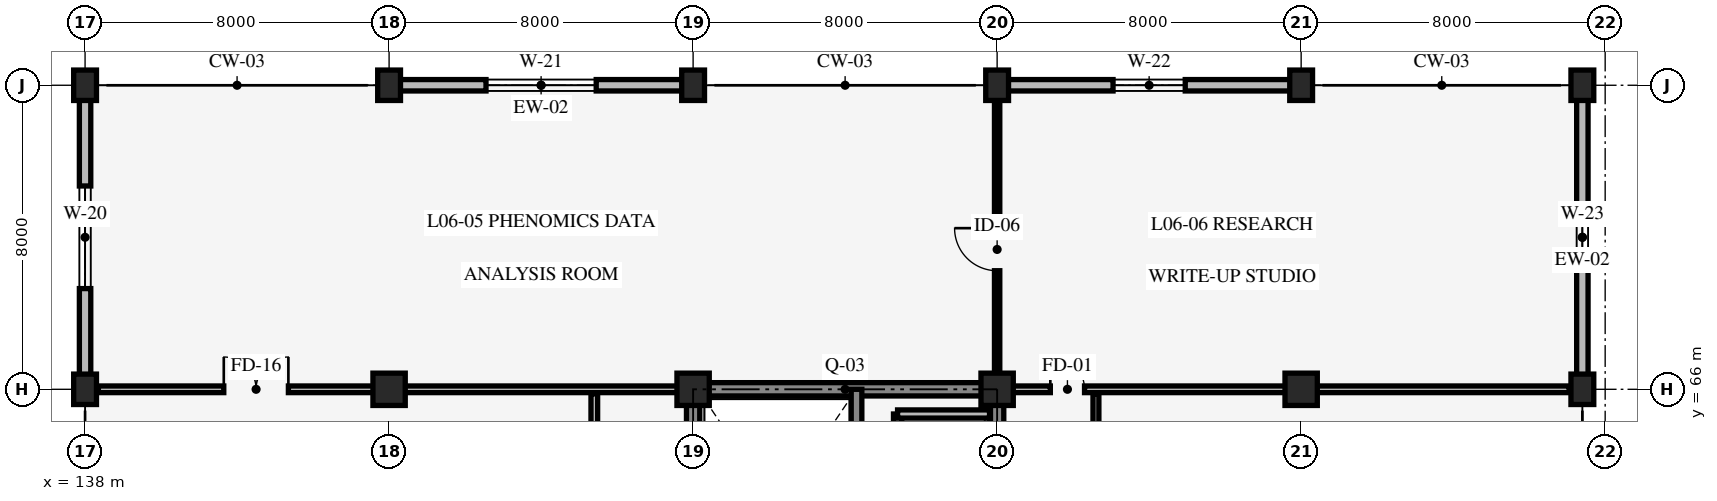
"""IFC4 building model, lengths in metres.
Left out: names, types, materials, properties, quantities, classifications, styles, units other than length and angle.
Written with IfcOpenShell. Run it as: python <this file> out.ifc"""

import sys

from ifc_helpers import new_model, si_unit, direction, frame, frame_2d, origin, origin_2d, place, context, subcontext, project, spatial, rectangle, extrude, element, fill, save


model = new_model("IFC4")
c1 = context("Model", 3, precision=1e-05, world=origin(), true_north=direction((0.0, 1.0)))
c2 = subcontext(c1, "Body", "Model", "MODEL_VIEW")
j1 = project(units=[si_unit("LENGTHUNIT", "METRE"), si_unit("PLANEANGLEUNIT", "RADIAN")], contexts=[c1])
p1 = place(None, origin())
s1 = spatial("IfcSite", under=j1, at=p1, CompositionType="ELEMENT")
p2 = place(p1, origin())
s2 = spatial("IfcBuilding", under=s1, at=p2, CompositionType="ELEMENT")
p3 = place(p2, frame((0.0, 0.0, 23.4)))
s3 = spatial("IfcBuildingStorey", under=s2, at=p3, CompositionType="ELEMENT", Elevation=23.4)
p4 = place(p3, frame((162.0, 58.0, 0.0), z_axis=(0.0, 0.0, 1.0), x_axis=(0.0, 1.0, 0.0)))
e1 = element("IfcWall", 1, at=p4, inside=s3, PredefinedType="SHEAR", context=c2, shape_type="SweptSolid", body=[
    extrude(rectangle(XDim=8.0, YDim=0.35, at=frame_2d((4.0, 0.0))), origin(), (0.0, 0.0, 1.0), 3.95),
])
p5 = place(p4, frame((3.275, 0.0, 0.0)))
e2 = element("IfcOpeningElement", 2, at=p5, cuts=e1, PredefinedType="OPENING", context=c2, shape_type="SweptSolid", body=[
    extrude(rectangle(XDim=1.05, YDim=2.2, at=frame_2d((0.525, 1.1))), frame((0.0, 0.185, 0.0), z_axis=(0.0, -1.0, 0.0), x_axis=(1.0, 0.0, 0.0)), (0.0, 0.0, 1.0), 0.37),
])
p6 = place(p4, frame((5.45, 0.0, 0.0)))
e3 = element("IfcOpeningElement", 3, at=p6, cuts=e1, PredefinedType="OPENING", context=c2, shape_type="SweptSolid", body=[
    extrude(rectangle(XDim=1.4, YDim=2.3, at=frame_2d((0.7, 1.15))), frame((0.0, 0.185, 0.0), z_axis=(0.0, -1.0, 0.0), x_axis=(1.0, 0.0, 0.0)), (0.0, 0.0, 1.0), 0.37),
])
for number, where, z_axis, x_axis in (
    (4, (162.0, 66.0, 0.0), (0.0, 0.0, 1.0), (-1.0, 0.0, 0.0)),
    (5, (154.0, 66.0, 0.0), (0.0, 0.0, 1.0), (0.0, -1.0, 0.0)),
):
    element("IfcWall", number, at=place(p3, frame(where, z_axis=z_axis, x_axis=x_axis)), inside=s3, PredefinedType="SHEAR", context=c2, shape_type="SweptSolid", body=[
        extrude(rectangle(XDim=8.0, YDim=0.35, at=frame_2d((4.0, 0.0))), origin(), (0.0, 0.0, 1.0), 3.95),
    ])
p7 = place(p3, frame((158.3, 58.0, 0.0), z_axis=(0.0, 0.0, 1.0), x_axis=(0.0, 1.0, 0.0)))
e6 = element("IfcWall", 6, at=p7, inside=s3, PredefinedType="SHEAR", context=c2, shape_type="SweptSolid", body=[
    extrude(rectangle(XDim=8.0, YDim=0.28, at=frame_2d((4.0, 0.0))), origin(), (0.0, 0.0, 1.0), 3.95),
])
for number, where, z_axis, x_axis in (
    (7, (138.0, 66.0, 0.0), (0.0, 0.0, 1.0), (1.0, 0.0, 0.0)),
    (8, (138.0, 74.0, 0.0), (0.0, 0.0, 1.0), (1.0, 0.0, 0.0)),
):
    element("IfcColumn", number, at=place(p3, frame(where, z_axis=z_axis, x_axis=x_axis)), inside=s3, PredefinedType="COLUMN", context=c2, shape_type="SweptSolid", body=[
        extrude(rectangle(XDim=0.6, YDim=0.8, at=origin_2d()), origin(), (0.0, 0.0, 1.0), 4.2),
    ])
p8 = place(p3, frame((146.0, 66.0, 0.0), z_axis=(0.0, 0.0, 1.0), x_axis=(1.0, 0.0, 0.0)))
e9 = element("IfcColumn", 9, at=p8, inside=s3, PredefinedType="COLUMN", context=c2, shape_type="SweptSolid", body=[
    extrude(rectangle(XDim=0.85, YDim=0.85, at=origin_2d()), origin(), (0.0, 0.0, 1.0), 4.2),
])
p9 = place(p3, frame((146.0, 74.0, 0.0), z_axis=(0.0, 0.0, 1.0), x_axis=(1.0, 0.0, 0.0)))
e10 = element("IfcColumn", 10, at=p9, inside=s3, PredefinedType="COLUMN", context=c2, shape_type="SweptSolid", body=[
    extrude(rectangle(XDim=0.6, YDim=0.8, at=origin_2d()), origin(), (0.0, 0.0, 1.0), 4.2),
])
p10 = place(p3, frame((154.0, 66.0, 0.0), z_axis=(0.0, 0.0, 1.0), x_axis=(1.0, 0.0, 0.0)))
e11 = element("IfcColumn", 11, at=p10, inside=s3, PredefinedType="COLUMN", context=c2, shape_type="SweptSolid", body=[
    extrude(rectangle(XDim=0.85, YDim=0.85, at=origin_2d()), origin(), (0.0, 0.0, 1.0), 4.2),
])
p11 = place(p3, frame((154.0, 74.0, 0.0), z_axis=(0.0, 0.0, 1.0), x_axis=(1.0, 0.0, 0.0)))
e12 = element("IfcColumn", 12, at=p11, inside=s3, PredefinedType="COLUMN", context=c2, shape_type="SweptSolid", body=[
    extrude(rectangle(XDim=0.6, YDim=0.8, at=origin_2d()), origin(), (0.0, 0.0, 1.0), 4.2),
])
p12 = place(p3, frame((162.0, 66.0, 0.0), z_axis=(0.0, 0.0, 1.0), x_axis=(1.0, 0.0, 0.0)))
e13 = element("IfcColumn", 13, at=p12, inside=s3, PredefinedType="COLUMN", context=c2, shape_type="SweptSolid", body=[
    extrude(rectangle(XDim=0.85, YDim=0.85, at=origin_2d()), origin(), (0.0, 0.0, 1.0), 4.2),
])
p13 = place(p3, frame((162.0, 74.0, 0.0), z_axis=(0.0, 0.0, 1.0), x_axis=(1.0, 0.0, 0.0)))
e14 = element("IfcColumn", 14, at=p13, inside=s3, PredefinedType="COLUMN", context=c2, shape_type="SweptSolid", body=[
    extrude(rectangle(XDim=0.6, YDim=0.8, at=origin_2d()), origin(), (0.0, 0.0, 1.0), 4.2),
])
p14 = place(p3, frame((170.0, 66.0, 0.0), z_axis=(0.0, 0.0, 1.0), x_axis=(1.0, 0.0, 0.0)))
e15 = element("IfcColumn", 15, at=p14, inside=s3, PredefinedType="COLUMN", context=c2, shape_type="SweptSolid", body=[
    extrude(rectangle(XDim=0.85, YDim=0.85, at=origin_2d()), origin(), (0.0, 0.0, 1.0), 4.2),
])
for number, where, z_axis, x_axis in (
    (16, (170.0, 74.0, 0.0), (0.0, 0.0, 1.0), (1.0, 0.0, 0.0)),
    (17, (177.4, 66.0, 0.0), (0.0, 0.0, 1.0), (1.0, 0.0, 0.0)),
    (18, (177.4, 74.0, 0.0), (0.0, 0.0, 1.0), (1.0, 0.0, 0.0)),
):
    element("IfcColumn", number, at=place(p3, frame(where, z_axis=z_axis, x_axis=x_axis)), inside=s3, PredefinedType="COLUMN", context=c2, shape_type="SweptSolid", body=[
        extrude(rectangle(XDim=0.6, YDim=0.8, at=origin_2d()), origin(), (0.0, 0.0, 1.0), 4.2),
    ])
p15 = place(p3, frame((138.0, 66.0, 0.0), z_axis=(0.0, 0.0, 1.0), x_axis=(0.0, 1.0, 0.0)))
e19 = element("IfcWall", 19, at=p15, inside=s3, PredefinedType="STANDARD", context=c2, shape_type="SweptSolid", body=[
    extrude(rectangle(XDim=8.0, YDim=0.3, at=frame_2d((4.0, 0.0))), origin(), (0.0, 0.0, 1.0), 3.19),
])
p16 = place(p15, frame((2.65, 0.0, 0.85)))
e20 = element("IfcOpeningElement", 20, at=p16, cuts=e19, PredefinedType="OPENING", context=c2, shape_type="SweptSolid", body=[
    extrude(rectangle(XDim=2.7, YDim=1.8, at=frame_2d((1.35, 0.9))), frame((0.0, 0.16, 0.0), z_axis=(0.0, -1.0, 0.0), x_axis=(1.0, 0.0, 0.0)), (0.0, 0.0, 1.0), 0.32),
])
p17 = place(p3, frame((146.0, 74.0, 0.0), z_axis=(0.0, 0.0, 1.0), x_axis=(1.0, 0.0, 0.0)))
e21 = element("IfcWall", 21, at=p17, inside=s3, PredefinedType="STANDARD", context=c2, shape_type="SweptSolid", body=[
    extrude(rectangle(XDim=8.0, YDim=0.3, at=frame_2d((4.0, 0.0))), origin(), (0.0, 0.0, 1.0), 3.14),
])
p18 = place(p17, frame((2.55, 0.0, 0.85)))
e22 = element("IfcOpeningElement", 22, at=p18, cuts=e21, PredefinedType="OPENING", context=c2, shape_type="SweptSolid", body=[
    extrude(rectangle(XDim=2.9, YDim=1.7, at=frame_2d((1.45, 0.85))), frame((0.0, 0.16, 0.0), z_axis=(0.0, -1.0, 0.0), x_axis=(1.0, 0.0, 0.0)), (0.0, 0.0, 1.0), 0.32),
])
p19 = place(p3, frame((162.0, 74.0, 0.0), z_axis=(0.0, 0.0, 1.0), x_axis=(1.0, 0.0, 0.0)))
e23 = element("IfcWall", 23, at=p19, inside=s3, PredefinedType="STANDARD", context=c2, shape_type="SweptSolid", body=[
    extrude(rectangle(XDim=8.0, YDim=0.3, at=frame_2d((4.0, 0.0))), origin(), (0.0, 0.0, 1.0), 3.14),
])
p20 = place(p19, frame((3.05, 0.0, 0.85)))
e24 = element("IfcOpeningElement", 24, at=p20, cuts=e23, PredefinedType="OPENING", context=c2, shape_type="SweptSolid", body=[
    extrude(rectangle(XDim=1.9, YDim=1.3, at=frame_2d((0.95, 0.65))), frame((0.0, 0.16, 0.0), z_axis=(0.0, -1.0, 0.0), x_axis=(1.0, 0.0, 0.0)), (0.0, 0.0, 1.0), 0.32),
])
p21 = place(p3, frame((177.4, 74.0, 0.0), z_axis=(0.0, 0.0, 1.0), x_axis=(0.0, -1.0, 0.0)))
e25 = element("IfcWall", 25, at=p21, inside=s3, PredefinedType="STANDARD", context=c2, shape_type="SweptSolid", body=[
    extrude(rectangle(XDim=8.0, YDim=0.3, at=frame_2d((4.0, 0.0))), origin(), (0.0, 0.0, 1.0), 3.19),
])
p22 = place(p21, frame((3.15, 0.0, 0.85)))
e26 = element("IfcOpeningElement", 26, at=p22, cuts=e25, PredefinedType="OPENING", context=c2, shape_type="SweptSolid", body=[
    extrude(rectangle(XDim=1.7, YDim=1.2, at=frame_2d((0.85, 0.6))), frame((0.0, 0.16, 0.0), z_axis=(0.0, -1.0, 0.0), x_axis=(1.0, 0.0, 0.0)), (0.0, 0.0, 1.0), 0.32),
])
p23 = place(p3, frame((159.38, 62.9, 0.0), z_axis=(0.0, 0.0, 1.0), x_axis=(0.0, 1.0, 0.0)))
e27 = element("IfcWall", 27, at=p23, inside=s3, PredefinedType="STANDARD", context=c2, shape_type="SweptSolid", body=[
    extrude(rectangle(XDim=2.45, YDim=0.215, at=frame_2d((1.225, 0.0))), origin(), (0.0, 0.0, 1.0), 3.9),
])
p24 = place(p3, frame((159.38, 65.35, 0.0), z_axis=(0.0, 0.0, 1.0), x_axis=(1.0, 0.0, 0.0)))
e28 = element("IfcWall", 28, at=p24, inside=s3, PredefinedType="STANDARD", context=c2, shape_type="SweptSolid", body=[
    extrude(rectangle(XDim=2.42, YDim=0.215, at=frame_2d((1.21, 0.0))), origin(), (0.0, 0.0, 1.0), 3.9),
])
p25 = place(p3, frame((151.4, 50.12, 0.0), z_axis=(0.0, 0.0, 1.0), x_axis=(0.0, 1.0, 0.0)))
e29 = element("IfcWall", 29, at=p25, inside=s3, PredefinedType="STANDARD", context=c2, shape_type="SweptSolid", body=[
    extrude(rectangle(XDim=15.76, YDim=0.175, at=frame_2d((7.88, 0.0))), origin(), (0.0, 0.0, 1.0), 3.9),
])
p26 = place(p25, frame((7.23, 0.0, 0.0)))
e30 = element("IfcOpeningElement", 30, at=p26, cuts=e29, PredefinedType="OPENING", context=c2, shape_type="SweptSolid", body=[
    extrude(rectangle(XDim=1.3, YDim=2.15, at=frame_2d((0.65, 1.075))), frame((0.0, 0.098, 0.0), z_axis=(0.0, -1.0, 0.0), x_axis=(1.0, 0.0, 0.0)), (0.0, 0.0, 1.0), 0.195),
])
p27 = place(p3, frame((164.6, 58.08, 0.0), z_axis=(0.0, 0.0, 1.0), x_axis=(0.0, 1.0, 0.0)))
e31 = element("IfcWall", 31, at=p27, inside=s3, PredefinedType="STANDARD", context=c2, shape_type="SweptSolid", body=[
    extrude(rectangle(XDim=7.8, YDim=0.155, at=frame_2d((3.9, 0.0))), origin(), (0.0, 0.0, 1.0), 3.9),
])
p28 = place(p27, frame((3.1, 0.0, 0.0)))
e32 = element("IfcOpeningElement", 32, at=p28, cuts=e31, PredefinedType="OPENING", context=c2, shape_type="SweptSolid", body=[
    extrude(rectangle(XDim=1.6, YDim=2.25, at=frame_2d((0.8, 1.125))), frame((0.0, 0.087, 0.0), z_axis=(0.0, -1.0, 0.0), x_axis=(1.0, 0.0, 0.0)), (0.0, 0.0, 1.0), 0.175),
])
p29 = place(p3, frame((138.35, 66.0, 0.0), z_axis=(0.0, 0.0, 1.0), x_axis=(1.0, 0.0, 0.0)))
e33 = element("IfcWall", 33, at=p29, inside=s3, PredefinedType="STANDARD", context=c2, shape_type="SweptSolid", body=[
    extrude(rectangle(XDim=15.3, YDim=0.175, at=frame_2d((7.65, 0.0))), origin(), (0.0, 0.0, 1.0), 3.14),
])
p30 = place(p29, frame((3.3, 0.0, 0.0)))
e34 = element("IfcOpeningElement", 34, at=p30, cuts=e33, PredefinedType="OPENING", context=c2, shape_type="SweptSolid", body=[
    extrude(rectangle(XDim=1.7, YDim=2.3, at=frame_2d((0.85, 1.15))), frame((0.0, 0.098, 0.0), z_axis=(0.0, -1.0, 0.0), x_axis=(1.0, 0.0, 0.0)), (0.0, 0.0, 1.0), 0.195),
])
p31 = place(p3, frame((162.0, 66.12, 0.0), z_axis=(0.0, 0.0, 1.0), x_axis=(0.0, 1.0, 0.0)))
e35 = element("IfcWall", 35, at=p31, inside=s3, PredefinedType="STANDARD", context=c2, shape_type="SweptSolid", body=[
    extrude(rectangle(XDim=7.83, YDim=0.14, at=frame_2d((3.915, 0.0))), origin(), (0.0, 0.0, 1.0), 3.19),
])
p32 = place(p31, frame((3.0, 0.0, 0.0)))
e36 = element("IfcOpeningElement", 36, at=p32, cuts=e35, PredefinedType="OPENING", context=c2, shape_type="SweptSolid", body=[
    extrude(rectangle(XDim=1.12, YDim=2.12, at=frame_2d((0.56, 1.06))), frame((0.0, 0.08, 0.0), z_axis=(0.0, -1.0, 0.0), x_axis=(1.0, 0.0, 0.0)), (0.0, 0.0, 1.0), 0.16),
])
p33 = place(p3, frame((162.35, 66.0, 0.0), z_axis=(0.0, 0.0, 1.0), x_axis=(1.0, 0.0, 0.0)))
e37 = element("IfcWall", 37, at=p33, inside=s3, PredefinedType="STANDARD", context=c2, shape_type="SweptSolid", body=[
    extrude(rectangle(XDim=14.7, YDim=0.175, at=frame_2d((7.35, 0.0))), origin(), (0.0, 0.0, 1.0), 3.14),
])
p34 = place(p33, frame((1.05, 0.0, 0.0)))
e38 = element("IfcOpeningElement", 38, at=p34, cuts=e37, PredefinedType="OPENING", context=c2, shape_type="SweptSolid", body=[
    extrude(rectangle(XDim=0.9, YDim=2.1, at=frame_2d((0.45, 1.05))), frame((0.0, 0.098, 0.0), z_axis=(0.0, -1.0, 0.0), x_axis=(1.0, 0.0, 0.0)), (0.0, 0.0, 1.0), 0.195),
])
p35 = place(p16, origin())
e39 = element("IfcWindow", 39, at=p35, inside=s3, PartitioningType="SINGLE_PANEL", PredefinedType="WINDOW", context=c2, shape_type="SweptSolid", body=[
    extrude(rectangle(XDim=2.7, YDim=1.8, at=frame_2d((1.35, 0.9))), frame((0.0, 0.03, 0.0), z_axis=(0.0, -1.0, 0.0), x_axis=(1.0, 0.0, 0.0)), (0.0, 0.0, 1.0), 0.06),
])
fill(e20, e39)
p36 = place(p18, origin())
e40 = element("IfcWindow", 40, at=p36, inside=s3, PartitioningType="SINGLE_PANEL", PredefinedType="WINDOW", context=c2, shape_type="SweptSolid", body=[
    extrude(rectangle(XDim=2.9, YDim=1.7, at=frame_2d((1.45, 0.85))), frame((0.0, 0.03, 0.0), z_axis=(0.0, -1.0, 0.0), x_axis=(1.0, 0.0, 0.0)), (0.0, 0.0, 1.0), 0.06),
])
fill(e22, e40)
p37 = place(p20, origin())
e41 = element("IfcWindow", 41, at=p37, inside=s3, PartitioningType="SINGLE_PANEL", PredefinedType="WINDOW", context=c2, shape_type="SweptSolid", body=[
    extrude(rectangle(XDim=1.9, YDim=1.3, at=frame_2d((0.95, 0.65))), frame((0.0, 0.03, 0.0), z_axis=(0.0, -1.0, 0.0), x_axis=(1.0, 0.0, 0.0)), (0.0, 0.0, 1.0), 0.06),
])
fill(e24, e41)
p38 = place(p22, origin())
e42 = element("IfcWindow", 42, at=p38, inside=s3, PartitioningType="SINGLE_PANEL", PredefinedType="WINDOW", context=c2, shape_type="SweptSolid", body=[
    extrude(rectangle(XDim=1.7, YDim=1.2, at=frame_2d((0.85, 0.6))), frame((0.0, 0.03, 0.0), z_axis=(0.0, -1.0, 0.0), x_axis=(1.0, 0.0, 0.0)), (0.0, 0.0, 1.0), 0.06),
])
fill(e26, e42)
p39 = place(p30, origin())
e43 = element("IfcDoor", 43, at=p39, inside=s3, OperationType="DOUBLE_DOOR_SINGLE_SWING", PredefinedType="DOOR", context=c2, shape_type="SweptSolid", body=[
    extrude(rectangle(XDim=1.7, YDim=2.3, at=frame_2d((0.85, 1.15))), frame((0.0, 0.025, 0.0), z_axis=(0.0, -1.0, 0.0), x_axis=(1.0, 0.0, 0.0)), (0.0, 0.0, 1.0), 0.05),
])
fill(e34, e43)
p40 = place(p32, origin())
e44 = element("IfcDoor", 44, at=p40, inside=s3, OperationType="SINGLE_SWING_RIGHT", PredefinedType="DOOR", context=c2, shape_type="SweptSolid", body=[
    extrude(rectangle(XDim=1.12, YDim=2.12, at=frame_2d((0.56, 1.06))), frame((0.0, 0.025, 0.0), z_axis=(0.0, -1.0, 0.0), x_axis=(1.0, 0.0, 0.0)), (0.0, 0.0, 1.0), 0.05),
])
fill(e36, e44)
p41 = place(p34, origin())
e45 = element("IfcDoor", 45, at=p41, inside=s3, OperationType="SINGLE_SWING_LEFT", PredefinedType="DOOR", context=c2, shape_type="SweptSolid", body=[
    extrude(rectangle(XDim=0.9, YDim=2.1, at=frame_2d((0.45, 1.05))), frame((0.0, 0.025, 0.0), z_axis=(0.0, -1.0, 0.0), x_axis=(1.0, 0.0, 0.0)), (0.0, 0.0, 1.0), 0.05),
])
fill(e38, e45)
save(model, sys.argv[1])
